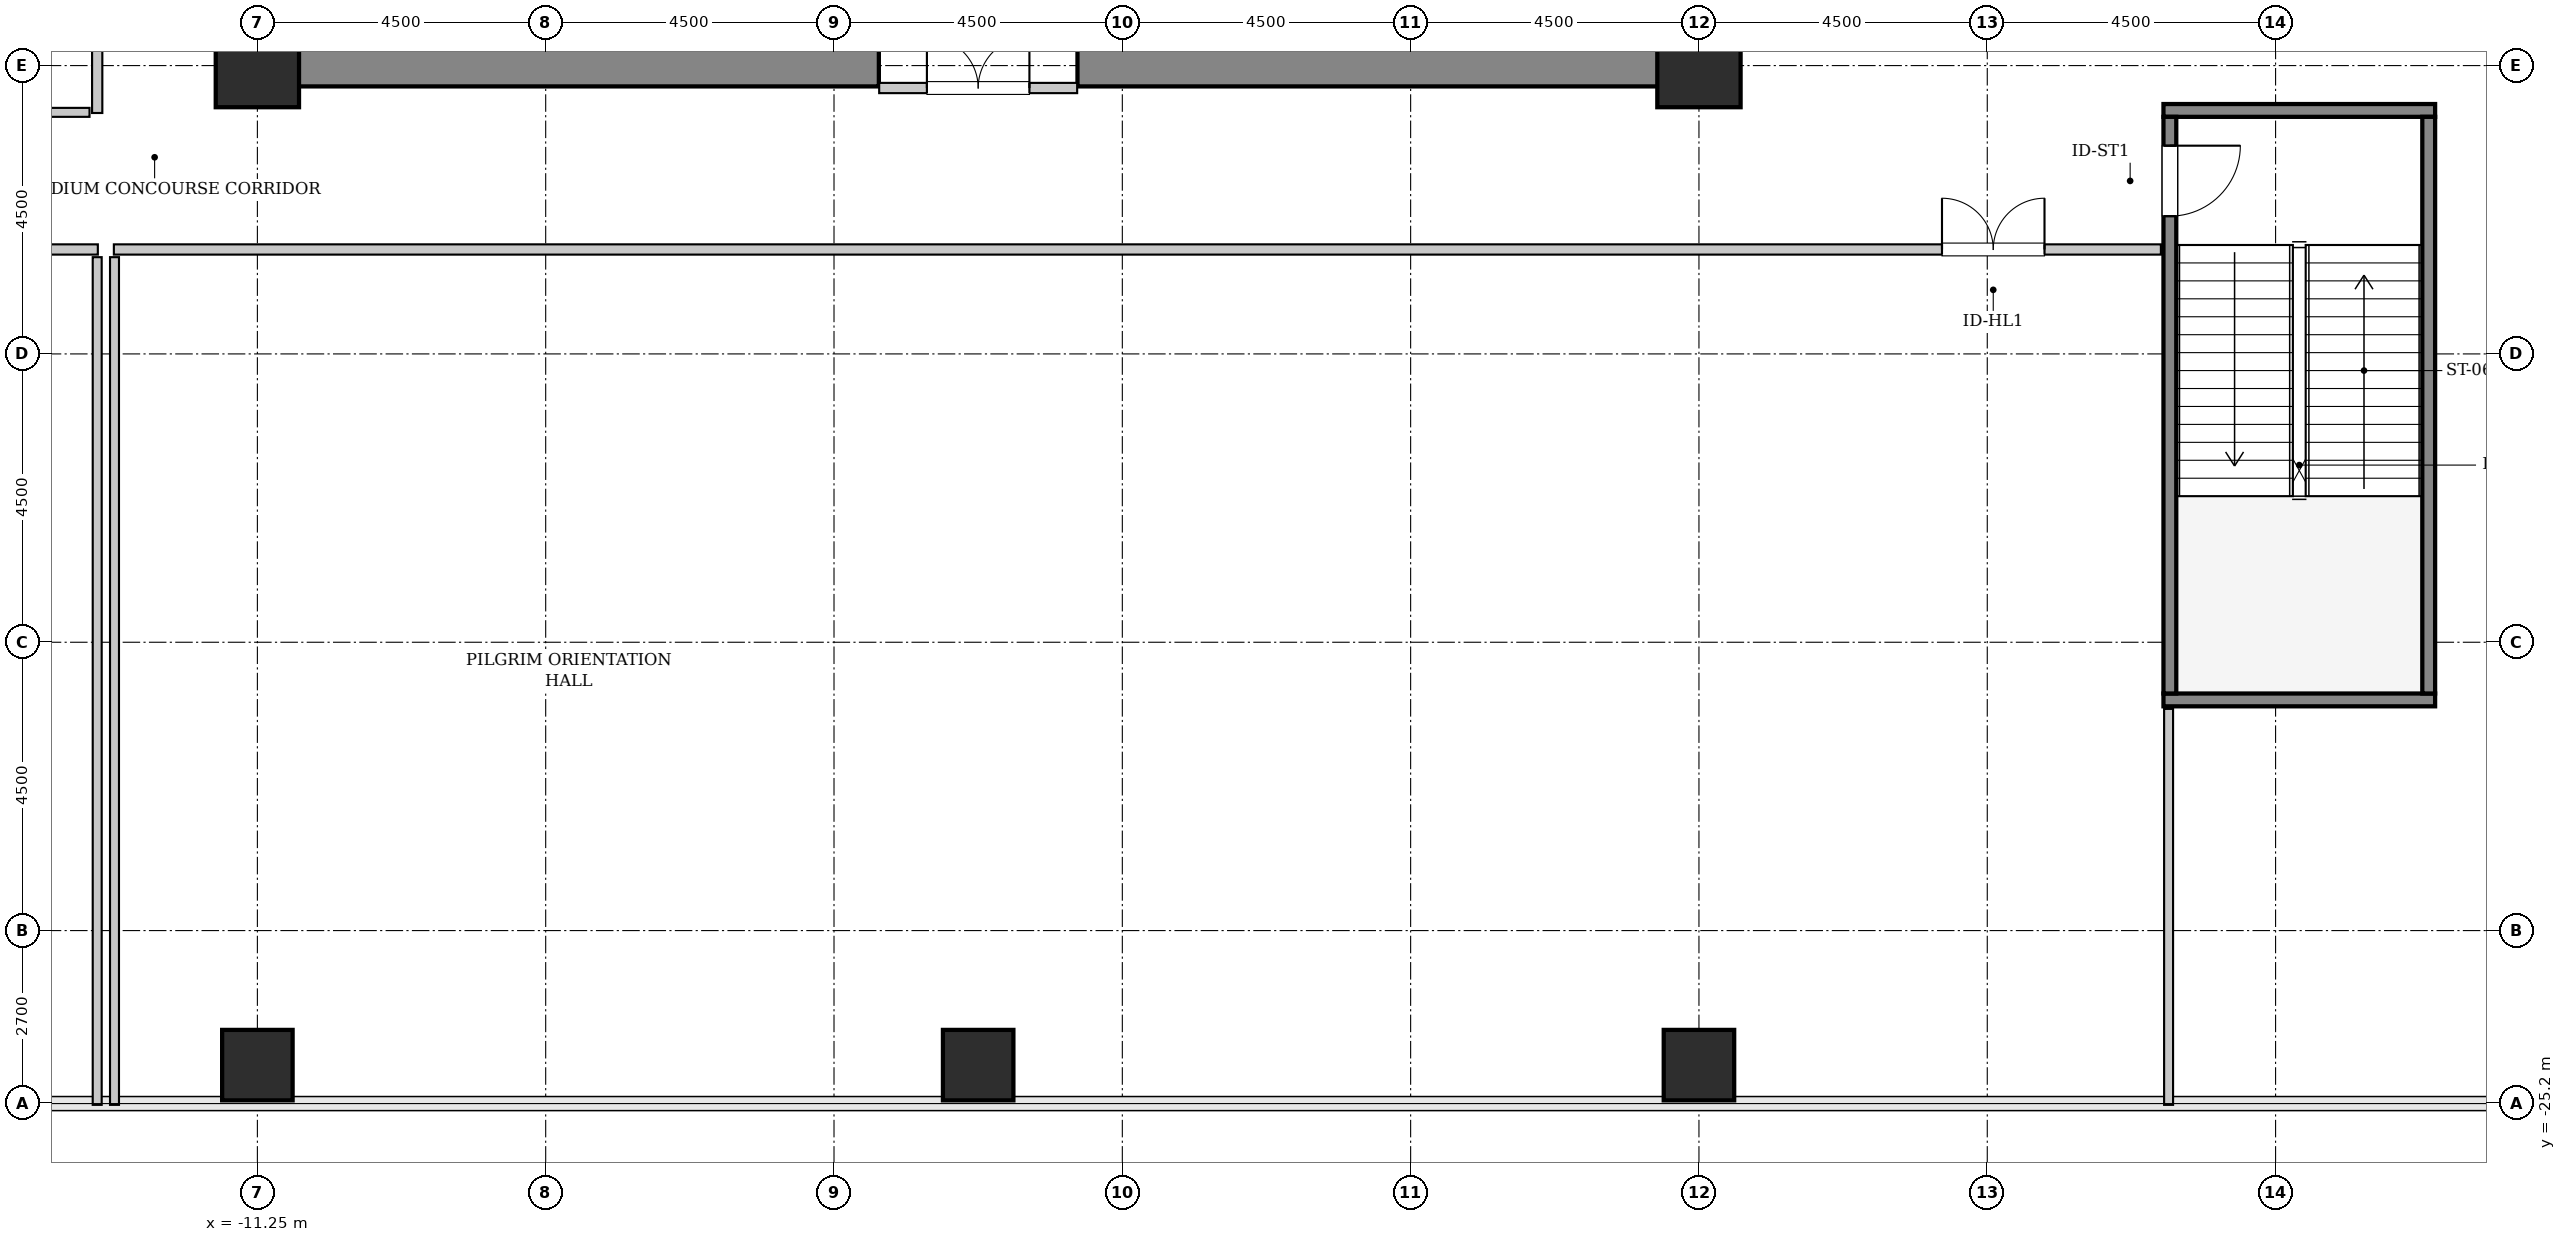
"""IFC4 building model, lengths in metres.
Left out: names, types, materials, properties, quantities, classifications, styles, units other than length and angle.
Written with IfcOpenShell. Run it as: python <this file> out.ifc"""

import sys

from ifc_helpers import new_model, si_unit, direction, frame, frame_2d, origin, origin_2d, place, context, subcontext, project, spatial, rectangle, hollow_rectangle, extrude, source, transform, mapped, element, fill, save


model = new_model("IFC4")
c1 = context("Model", 3, precision=1e-05, world=origin(), true_north=direction((0.0, 1.0)))
c2 = subcontext(c1, "Body", "Model", "MODEL_VIEW")
j1 = project(units=[si_unit("LENGTHUNIT", "METRE"), si_unit("PLANEANGLEUNIT", "RADIAN")], contexts=[c1])
p1 = place(None, origin())
s1 = spatial("IfcSite", under=j1, at=p1, CompositionType="ELEMENT")
p2 = place(p1, origin())
s2 = spatial("IfcBuilding", under=s1, at=p2, CompositionType="ELEMENT")
p3 = place(p2, frame((0.0, 0.0, 6.0)))
s3 = spatial("IfcBuildingStorey", under=s2, at=p3, CompositionType="ELEMENT", Elevation=6.0)
m1 = source(origin(), c2, "Body", "SweptSolid", [
    extrude(rectangle(XDim=10.025, YDim=0.65, at=frame_2d((5.012, 0.0))), origin(), (0.0, 0.0, 1.0), 5.4),
])
for number, where, z_axis, x_axis in (
    (1, (-11.575, -9.0, 0.0), (0.0, 0.0, 1.0), (1.0, 0.0, 0.0)),
    (2, (1.55, -9.0, 0.0), (0.0, 0.0, 1.0), (1.0, 0.0, 0.0)),
):
    element("IfcWall", number, at=place(p3, frame(where, z_axis=z_axis, x_axis=x_axis)), inside=s3, PredefinedType="SHEAR", context=c2, shape_type="MappedRepresentation", body=[
        mapped(m1, transform((0.0, 0.0, 0.0), x_axis=(1.0, 0.0, 0.0), y_axis=(0.0, 1.0, 0.0), z_axis=(0.0, 0.0, 1.0), scale=1.0)),
    ])
m2 = source(origin(), c2, "Body", "SweptSolid", [
    extrude(hollow_rectangle(XDim=1.1, YDim=1.1, WallThickness=0.055, InnerFilletRadius=0.055, OuterFilletRadius=0.11, at=origin_2d()), origin(), (0.0, 0.0, 1.0), 5.4),
])
p4 = place(p3, frame((-11.25, -24.6, 0.0), z_axis=(0.0, 0.0, 1.0), x_axis=(1.0, 0.0, 0.0)))
e3 = element("IfcColumn", 3, at=p4, inside=s3, PredefinedType="COLUMN", context=c2, shape_type="MappedRepresentation", body=[
    mapped(m2, transform((0.0, 0.0, 0.0), x_axis=(1.0, 0.0, 0.0), y_axis=(0.0, 1.0, 0.0), z_axis=(0.0, 0.0, 1.0), scale=1.0)),
])
m3 = source(origin(), c2, "Body", "SweptSolid", [
    extrude(hollow_rectangle(XDim=1.3, YDim=1.3, WallThickness=0.065, InnerFilletRadius=0.065, OuterFilletRadius=0.13, at=origin_2d()), origin(), (0.0, 0.0, 1.0), 5.4),
])
p5 = place(p3, frame((-11.25, -9.0, 0.0), z_axis=(0.0, 0.0, 1.0), x_axis=(1.0, 0.0, 0.0)))
e4 = element("IfcColumn", 4, at=p5, inside=s3, PredefinedType="COLUMN", context=c2, shape_type="MappedRepresentation", body=[
    mapped(m3, transform((0.0, 0.0, 0.0), x_axis=(1.0, 0.0, 0.0), y_axis=(0.0, 1.0, 0.0), z_axis=(0.0, 0.0, 1.0), scale=1.0)),
])
for number, where, z_axis, x_axis in (
    (5, (0.0, -24.6, 0.0), (0.0, 0.0, 1.0), (1.0, 0.0, 0.0)),
    (6, (11.25, -24.6, 0.0), (0.0, 0.0, 1.0), (1.0, 0.0, 0.0)),
):
    element("IfcColumn", number, at=place(p3, frame(where, z_axis=z_axis, x_axis=x_axis)), inside=s3, PredefinedType="COLUMN", context=c2, shape_type="MappedRepresentation", body=[
        mapped(m2, transform((0.0, 0.0, 0.0), x_axis=(1.0, 0.0, 0.0), y_axis=(0.0, 1.0, 0.0), z_axis=(0.0, 0.0, 1.0), scale=1.0)),
    ])
p6 = place(p3, frame((11.25, -9.0, 0.0), z_axis=(0.0, 0.0, 1.0), x_axis=(1.0, 0.0, 0.0)))
e7 = element("IfcColumn", 7, at=p6, inside=s3, PredefinedType="COLUMN", context=c2, shape_type="MappedRepresentation", body=[
    mapped(m3, transform((0.0, 0.0, 0.0), x_axis=(1.0, 0.0, 0.0), y_axis=(0.0, 1.0, 0.0), z_axis=(0.0, 0.0, 1.0), scale=1.0)),
])
m4 = source(origin(), c2, "Body", "SweptSolid", [
    extrude(rectangle(XDim=4.24, YDim=0.2, at=frame_2d((2.12, 0.0))), origin(), (0.0, 0.0, 1.0), 5.4),
])
for number, where, z_axis, x_axis in (
    (8, (18.5, -9.7, 0.0), (0.0, 0.0, 1.0), (1.0, 0.0, 0.0)),
    (9, (18.5, -18.9, 0.0), (0.0, 0.0, 1.0), (1.0, 0.0, 0.0)),
):
    element("IfcWall", number, at=place(p3, frame(where, z_axis=z_axis, x_axis=x_axis)), inside=s3, PredefinedType="SOLIDWALL", context=c2, shape_type="MappedRepresentation", body=[
        mapped(m4, transform((0.0, 0.0, 0.0), x_axis=(1.0, 0.0, 0.0), y_axis=(0.0, 1.0, 0.0), z_axis=(0.0, 0.0, 1.0), scale=1.0)),
    ])
m5 = source(origin(), c2, "Body", "SweptSolid", [
    extrude(rectangle(XDim=9.0, YDim=0.2, at=frame_2d((4.5, 0.0))), origin(), (0.0, 0.0, 1.0), 5.4),
])
p7 = place(p3, frame((18.6, -9.8, 0.0), z_axis=(0.0, 0.0, 1.0), x_axis=(0.0, -1.0, 0.0)))
e10 = element("IfcWall", 10, at=p7, inside=s3, PredefinedType="SOLIDWALL", context=c2, shape_type="MappedRepresentation", body=[
    mapped(m5, transform((0.0, 0.0, 0.0), x_axis=(1.0, 0.0, 0.0), y_axis=(0.0, 1.0, 0.0), z_axis=(0.0, 0.0, 1.0), scale=1.0)),
])
p8 = place(p7, frame((0.45, 0.0, 0.0)))
e11 = element("IfcOpeningElement", 11, at=p8, cuts=e10, PredefinedType="OPENING", context=c2, shape_type="SweptSolid", body=[
    extrude(rectangle(XDim=1.1, YDim=2.15, at=frame_2d((0.55, 1.075))), frame((0.0, 0.11, 0.0), z_axis=(0.0, -1.0, 0.0), x_axis=(1.0, 0.0, 0.0)), (0.0, 0.0, 1.0), 0.22),
])
p9 = place(p3, frame((22.64, -9.8, 0.0), z_axis=(0.0, 0.0, 1.0), x_axis=(0.0, -1.0, 0.0)))
e12 = element("IfcWall", 12, at=p9, inside=s3, PredefinedType="SOLIDWALL", context=c2, shape_type="MappedRepresentation", body=[
    mapped(m5, transform((0.0, 0.0, 0.0), x_axis=(1.0, 0.0, 0.0), y_axis=(0.0, 1.0, 0.0), z_axis=(0.0, 0.0, 1.0), scale=1.0)),
])
m6 = source(origin(), c2, "Body", "SweptSolid", [
    extrude(rectangle(XDim=3.09, YDim=0.16, at=frame_2d((1.545, 0.0))), origin(), (0.0, 0.0, 1.0), 3.975),
])
p10 = place(p3, frame((-1.545, -9.35, 0.0), z_axis=(0.0, 0.0, 1.0), x_axis=(1.0, 0.0, 0.0)))
e13 = element("IfcWall", 13, at=p10, inside=s3, PredefinedType="PARTITIONING", context=c2, shape_type="MappedRepresentation", body=[
    mapped(m6, transform((0.0, 0.0, 0.0), x_axis=(1.0, 0.0, 0.0), y_axis=(0.0, 1.0, 0.0), z_axis=(0.0, 0.0, 1.0), scale=1.0)),
])
p11 = place(p10, frame((0.745, 0.0, 0.0)))
e14 = element("IfcOpeningElement", 14, at=p11, cuts=e13, PredefinedType="OPENING", context=c2, shape_type="SweptSolid", body=[
    extrude(rectangle(XDim=1.6, YDim=2.3, at=frame_2d((0.8, 1.15))), frame((0.0, 0.09, 0.0), z_axis=(0.0, -1.0, 0.0), x_axis=(1.0, 0.0, 0.0)), (0.0, 0.0, 1.0), 0.18),
])
m7 = source(origin(), c2, "Body", "SweptSolid", [
    extrude(rectangle(XDim=19.48, YDim=0.16, at=frame_2d((9.74, 0.0))), origin(), (0.0, 0.0, 1.0), 5.085),
])
p12 = place(p3, frame((-13.75, -9.74, 0.0), z_axis=(0.0, 0.0, 1.0), x_axis=(0.0, 1.0, 0.0)))
e15 = element("IfcWall", 15, at=p12, inside=s3, PredefinedType="PARTITIONING", context=c2, shape_type="MappedRepresentation", body=[
    mapped(m7, transform((0.0, 0.0, 0.0), x_axis=(1.0, 0.0, 0.0), y_axis=(0.0, 1.0, 0.0), z_axis=(0.0, 0.0, 1.0), scale=1.0)),
])
p13 = place(p12, frame((8.94, 0.0, 0.0)))
e16 = element("IfcOpeningElement", 16, at=p13, cuts=e15, PredefinedType="OPENING", context=c2, shape_type="SweptSolid", body=[
    extrude(rectangle(XDim=1.6, YDim=2.3, at=frame_2d((0.8, 1.15))), frame((0.0, 0.09, 0.0), z_axis=(0.0, -1.0, 0.0), x_axis=(1.0, 0.0, 0.0)), (0.0, 0.0, 1.0), 0.18),
])
m8 = source(origin(), c2, "Body", "SweptSolid", [
    extrude(rectangle(XDim=13.625, YDim=0.14, at=frame_2d((6.812, 0.0))), origin(), (0.0, 0.0, 1.0), 5.085),
])
p14 = place(p3, frame((-27.495, -9.73, 0.0), z_axis=(0.0, 0.0, 1.0), x_axis=(1.0, 0.0, 0.0)))
e17 = element("IfcWall", 17, at=p14, inside=s3, PredefinedType="PARTITIONING", context=c2, shape_type="MappedRepresentation", body=[
    mapped(m8, transform((0.0, 0.0, 0.0), x_axis=(1.0, 0.0, 0.0), y_axis=(0.0, 1.0, 0.0), z_axis=(0.0, 0.0, 1.0), scale=1.0)),
])
m9 = source(origin(), c2, "Body", "SweptSolid", [
    extrude(rectangle(XDim=13.72, YDim=0.16, at=frame_2d((6.86, 0.0))), origin(), (0.0, 0.0, 1.0), 5.085),
])
p15 = place(p3, frame((-27.46, -11.87, 0.0), z_axis=(0.0, 0.0, 1.0), x_axis=(1.0, 0.0, 0.0)))
e18 = element("IfcWall", 18, at=p15, inside=s3, PredefinedType="PARTITIONING", context=c2, shape_type="MappedRepresentation", body=[
    mapped(m9, transform((0.0, 0.0, 0.0), x_axis=(1.0, 0.0, 0.0), y_axis=(0.0, 1.0, 0.0), z_axis=(0.0, 0.0, 1.0), scale=1.0)),
])
p16 = place(p15, frame((6.06, 0.0, 0.0)))
e19 = element("IfcOpeningElement", 19, at=p16, cuts=e18, PredefinedType="OPENING", context=c2, shape_type="SweptSolid", body=[
    extrude(rectangle(XDim=1.6, YDim=2.3, at=frame_2d((0.8, 1.15))), frame((0.0, 0.09, 0.0), z_axis=(0.0, -1.0, 0.0), x_axis=(1.0, 0.0, 0.0)), (0.0, 0.0, 1.0), 0.18),
])
m10 = source(origin(), c2, "Body", "SweptSolid", [
    extrude(rectangle(XDim=13.23, YDim=0.14, at=frame_2d((6.615, 0.0))), origin(), (0.0, 0.0, 1.0), 5.085),
])
p17 = place(p3, frame((-13.75, -25.22, 0.0), z_axis=(0.0, 0.0, 1.0), x_axis=(0.0, 1.0, 0.0)))
e20 = element("IfcWall", 20, at=p17, inside=s3, PredefinedType="PARTITIONING", context=c2, shape_type="MappedRepresentation", body=[
    mapped(m10, transform((0.0, 0.0, 0.0), x_axis=(1.0, 0.0, 0.0), y_axis=(0.0, 1.0, 0.0), z_axis=(0.0, 0.0, 1.0), scale=1.0)),
])
m11 = source(origin(), c2, "Body", "SweptSolid", [
    extrude(rectangle(XDim=31.95, YDim=0.16, at=frame_2d((15.975, 0.0))), origin(), (0.0, 0.0, 1.0), 5.085),
])
p18 = place(p3, frame((-13.49, -11.87, 0.0), z_axis=(0.0, 0.0, 1.0), x_axis=(1.0, 0.0, 0.0)))
e21 = element("IfcWall", 21, at=p18, inside=s3, PredefinedType="PARTITIONING", context=c2, shape_type="MappedRepresentation", body=[
    mapped(m11, transform((0.0, 0.0, 0.0), x_axis=(1.0, 0.0, 0.0), y_axis=(0.0, 1.0, 0.0), z_axis=(0.0, 0.0, 1.0), scale=1.0)),
])
p19 = place(p18, frame((28.533, 0.0, 0.0)))
e22 = element("IfcOpeningElement", 22, at=p19, cuts=e21, PredefinedType="OPENING", context=c2, shape_type="SweptSolid", body=[
    extrude(rectangle(XDim=1.6, YDim=2.3, at=frame_2d((0.8, 1.15))), frame((0.0, 0.09, 0.0), z_axis=(0.0, -1.0, 0.0), x_axis=(1.0, 0.0, 0.0)), (0.0, 0.0, 1.0), 0.18),
])
m12 = source(origin(), c2, "Body", "SweptSolid", [
    extrude(rectangle(XDim=6.18, YDim=0.14, at=frame_2d((3.09, 0.0))), origin(), (0.0, 0.0, 1.0), 5.085),
])
p20 = place(p3, frame((18.58, -25.22, 0.0), z_axis=(0.0, 0.0, 1.0), x_axis=(0.0, 1.0, 0.0)))
e23 = element("IfcWall", 23, at=p20, inside=s3, PredefinedType="PARTITIONING", context=c2, shape_type="MappedRepresentation", body=[
    mapped(m12, transform((0.0, 0.0, 0.0), x_axis=(1.0, 0.0, 0.0), y_axis=(0.0, 1.0, 0.0), z_axis=(0.0, 0.0, 1.0), scale=1.0)),
])
p21 = place(p3, frame((-13.48, -25.22, 0.0), z_axis=(0.0, 0.0, 1.0), x_axis=(0.0, 1.0, 0.0)))
e24 = element("IfcWall", 24, at=p21, inside=s3, PredefinedType="PARTITIONING", context=c2, shape_type="MappedRepresentation", body=[
    mapped(m10, transform((0.0, 0.0, 0.0), x_axis=(1.0, 0.0, 0.0), y_axis=(0.0, 1.0, 0.0), z_axis=(0.0, 0.0, 1.0), scale=1.0)),
])
m13 = source(origin(), c2, "Body", "SweptSolid", [
    extrude(rectangle(XDim=1.1, YDim=2.15, at=frame_2d((0.55, 1.075))), frame((0.0, 0.025, 0.0), z_axis=(0.0, -1.0, 0.0), x_axis=(1.0, 0.0, 0.0)), (0.0, 0.0, 1.0), 0.05),
])
p22 = place(p8, origin())
e25 = element("IfcDoor", 25, at=p22, inside=s3, OperationType="SINGLE_SWING_LEFT", PredefinedType="DOOR", context=c2, shape_type="MappedRepresentation", body=[
    mapped(m13, transform((0.0, 0.0, 0.0), x_axis=(1.0, 0.0, 0.0), y_axis=(0.0, 1.0, 0.0), z_axis=(0.0, 0.0, 1.0), scale=1.0)),
])
fill(e11, e25)
m14 = source(origin(), c2, "Body", "SweptSolid", [
    extrude(rectangle(XDim=1.6, YDim=2.3, at=frame_2d((0.8, 1.15))), frame((0.0, 0.025, 0.0), z_axis=(0.0, -1.0, 0.0), x_axis=(1.0, 0.0, 0.0)), (0.0, 0.0, 1.0), 0.05),
])
p23 = place(p11, origin())
e26 = element("IfcDoor", 26, at=p23, inside=s3, OperationType="DOUBLE_DOOR_SINGLE_SWING", PredefinedType="DOOR", context=c2, shape_type="MappedRepresentation", body=[
    mapped(m14, transform((0.0, 0.0, 0.0), x_axis=(1.0, 0.0, 0.0), y_axis=(0.0, 1.0, 0.0), z_axis=(0.0, 0.0, 1.0), scale=1.0)),
])
fill(e14, e26)
p24 = place(p19, origin())
e27 = element("IfcDoor", 27, at=p24, inside=s3, OperationType="DOUBLE_DOOR_SINGLE_SWING", PredefinedType="DOOR", context=c2, shape_type="MappedRepresentation", body=[
    mapped(m14, transform((0.0, 0.0, 0.0), x_axis=(1.0, 0.0, 0.0), y_axis=(0.0, 1.0, 0.0), z_axis=(0.0, 0.0, 1.0), scale=1.0)),
])
fill(e22, e27)
save(model, sys.argv[1])
